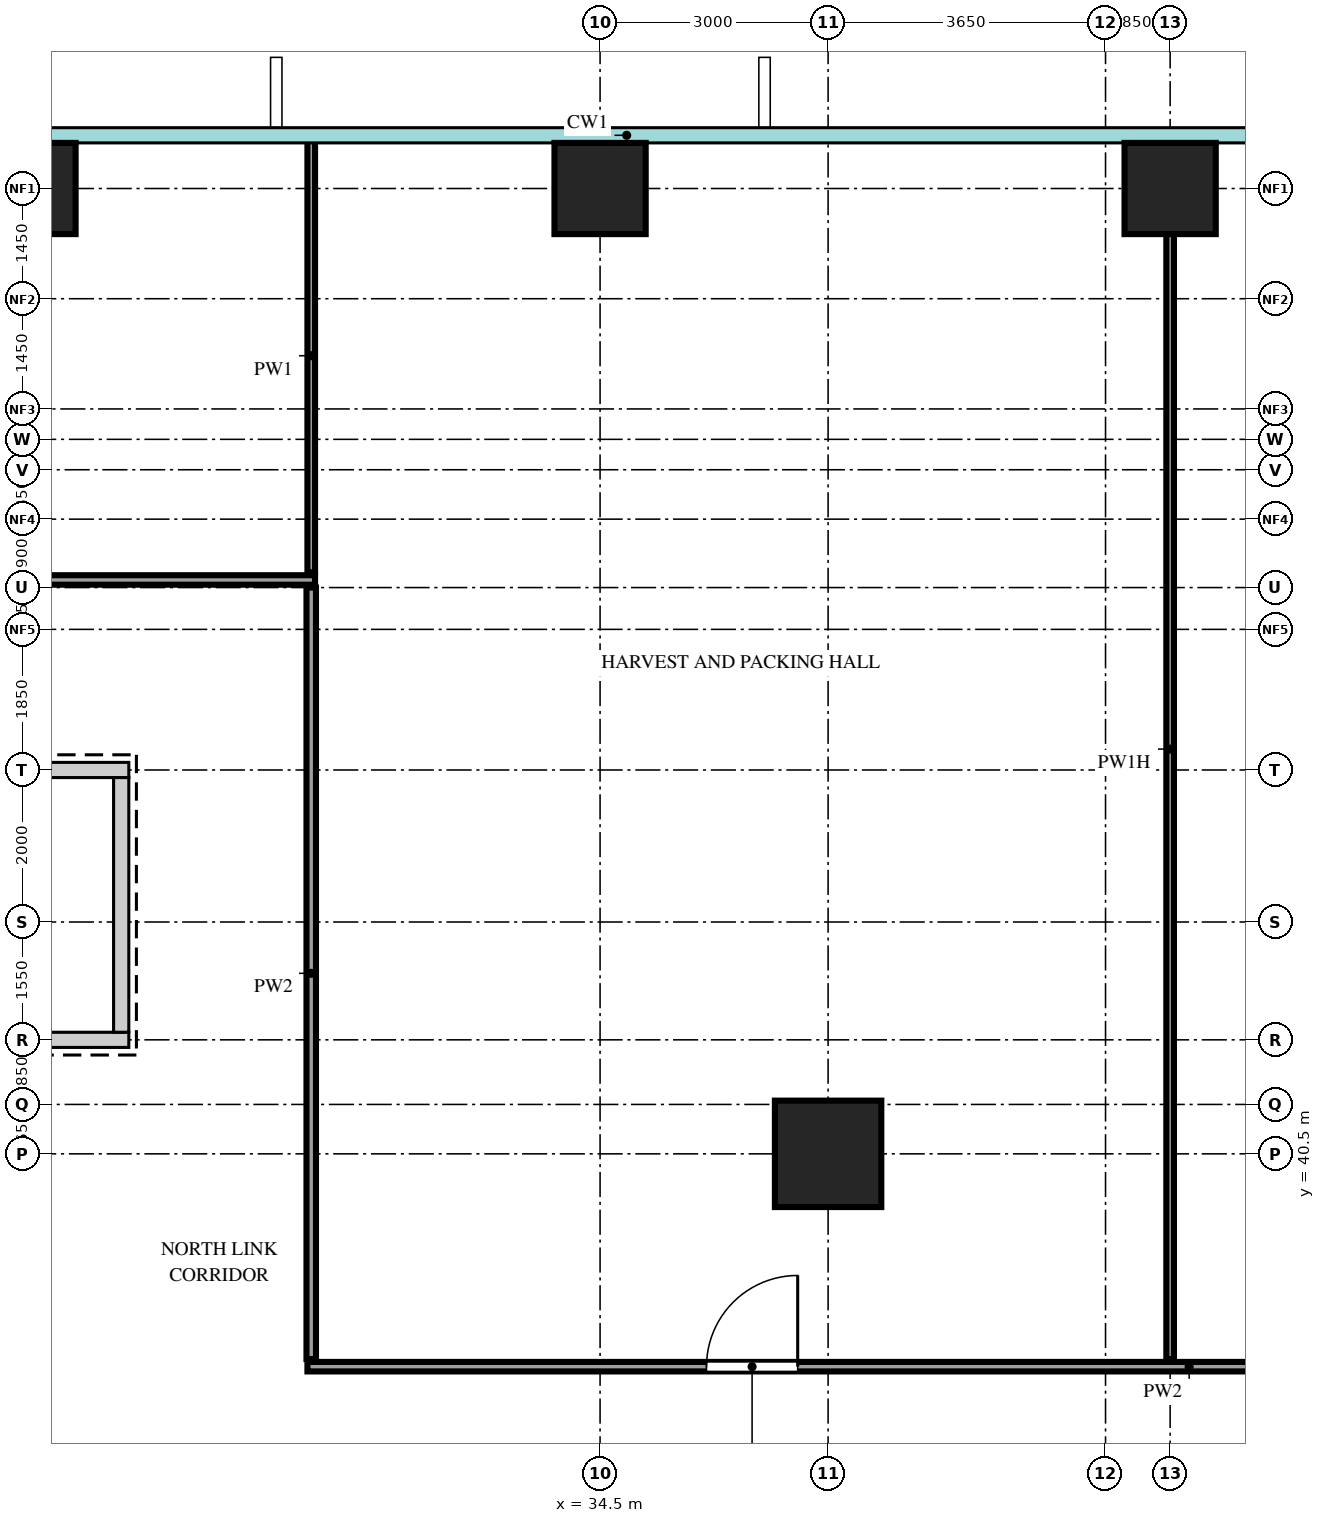
"""IFC4 building model, lengths in metres.
Left out: names, types, materials, properties, quantities, classifications, styles, units other than length and angle.
Written with IfcOpenShell. Run it as: python <this file> out.ifc"""

import sys

from ifc_helpers import new_model, si_unit, direction, frame, frame_2d, origin, origin_2d, place, context, subcontext, project, spatial, rectangle, extrude, source, transform, mapped, element, fill, save


model = new_model("IFC4")
c1 = context("Model", 3, precision=1e-05, world=origin(), true_north=direction((0.0, 1.0)))
c2 = subcontext(c1, "Body", "Model", "MODEL_VIEW")
j1 = project(units=[si_unit("LENGTHUNIT", "METRE"), si_unit("PLANEANGLEUNIT", "RADIAN")], contexts=[c1])
p1 = place(None, origin())
s1 = spatial("IfcSite", under=j1, at=p1, CompositionType="ELEMENT")
p2 = place(p1, origin())
s2 = spatial("IfcBuilding", under=s1, at=p2, CompositionType="ELEMENT")
p3 = place(p2, frame((0.0, 0.0, 33.0)))
s3 = spatial("IfcBuildingStorey", under=s2, at=p3, CompositionType="ELEMENT", Elevation=33.0)
m1 = source(origin(), c2, "Body", "SweptSolid", [
    extrude(rectangle(XDim=7.1, YDim=0.2, at=frame_2d((3.55, 0.0))), origin(), (0.0, 0.0, 1.0), 4.2),
])
p4 = place(p3, frame((21.2, 45.55, 0.0), z_axis=(0.0, 0.0, 1.0), x_axis=(1.0, 0.0, 0.0)))
e1 = element("IfcWall", 1, at=p4, inside=s3, PredefinedType="SHEAR", context=c2, shape_type="MappedRepresentation", body=[
    mapped(m1, transform((0.0, 0.0, 0.0))),
])
m2 = source(origin(), c2, "Body", "SweptSolid", [
    extrude(rectangle(XDim=1.2, YDim=2.1, at=frame_2d((0.6, 1.05))), frame((0.0, 0.11, 0.0), z_axis=(0.0, -1.0, 0.0), x_axis=(1.0, 0.0, 0.0)), (0.0, 0.0, 1.0), 0.22),
])
p5 = place(p4, frame((0.15, 0.0, 0.0)))
e2 = element("IfcOpeningElement", 2, at=p5, cuts=e1, PredefinedType="OPENING", context=c2, shape_type="MappedRepresentation", body=[
    mapped(m2, transform((0.0, 0.0, 0.0))),
])
p6 = place(p3, frame((21.2, 42.0, 0.0), z_axis=(0.0, 0.0, 1.0), x_axis=(1.0, 0.0, 0.0)))
e3 = element("IfcWall", 3, at=p6, inside=s3, PredefinedType="SHEAR", context=c2, shape_type="MappedRepresentation", body=[
    mapped(m1, transform((0.0, 0.0, 0.0))),
])
m3 = source(origin(), c2, "Body", "SweptSolid", [
    extrude(rectangle(XDim=3.35, YDim=0.2, at=frame_2d((1.675, 0.0))), origin(), (0.0, 0.0, 1.0), 4.2),
])
p7 = place(p3, frame((28.2, 42.1, 0.0), z_axis=(0.0, 0.0, 1.0), x_axis=(0.0, 1.0, 0.0)))
e4 = element("IfcWall", 4, at=p7, inside=s3, PredefinedType="SHEAR", context=c2, shape_type="MappedRepresentation", body=[
    mapped(m3, transform((0.0, 0.0, 0.0))),
])
m4 = source(origin(), c2, "Body", "SweptSolid", [
    extrude(rectangle(XDim=1.2, YDim=1.2, at=origin_2d()), origin(), (0.0, 0.0, 1.0), 4.2),
])
for number, where, z_axis, x_axis in (
    (5, (27.0, 53.2, 0.0), (0.0, 0.0, 1.0), (1.0, 0.0, 0.0)),
    (6, (34.5, 53.2, 0.0), (0.0, 0.0, 1.0), (1.0, 0.0, 0.0)),
    (7, (42.0, 53.2, 0.0), (0.0, 0.0, 1.0), (1.0, 0.0, 0.0)),
):
    element("IfcColumn", number, at=place(p3, frame(where, z_axis=z_axis, x_axis=x_axis)), inside=s3, PredefinedType="COLUMN", context=c2, shape_type="MappedRepresentation", body=[
        mapped(m4, transform((0.0, 0.0, 0.0))),
    ])
m5 = source(origin(), c2, "Body", "SweptSolid", [
    extrude(rectangle(XDim=1.4, YDim=1.4, at=origin_2d()), origin(), (0.0, 0.0, 1.0), 4.2),
])
p8 = place(p3, frame((37.5, 40.5, 0.0), z_axis=(0.0, 0.0, 1.0), x_axis=(1.0, 0.0, 0.0)))
e8 = element("IfcColumn", 8, at=p8, inside=s3, PredefinedType="COLUMN", context=c2, shape_type="MappedRepresentation", body=[
    mapped(m5, transform((0.0, 0.0, 0.0))),
])
m6 = source(origin(), c2, "Body", "SweptSolid", [
    extrude(rectangle(XDim=23.2, YDim=0.125, at=frame_2d((11.6, 0.0))), origin(), (0.0, 0.0, 1.0), 4.3),
])
p9 = place(p3, frame((30.65, 37.7, 0.0), z_axis=(0.0, 0.0, 1.0), x_axis=(1.0, 0.0, 0.0)))
e9 = element("IfcWall", 9, at=p9, inside=s3, PredefinedType="PARTITIONING", context=c2, shape_type="MappedRepresentation", body=[
    mapped(m6, transform((0.0, 0.0, 0.0))),
])
m7 = source(origin(), c2, "Body", "SweptSolid", [
    extrude(rectangle(XDim=1.2, YDim=2.1, at=frame_2d((0.6, 1.05))), frame((0.0, 0.073, 0.0), z_axis=(0.0, -1.0, 0.0), x_axis=(1.0, 0.0, 0.0)), (0.0, 0.0, 1.0), 0.145),
])
p10 = place(p9, frame((5.25, 0.0, 0.0)))
e10 = element("IfcOpeningElement", 10, at=p10, cuts=e9, PredefinedType="OPENING", context=c2, shape_type="MappedRepresentation", body=[
    mapped(m7, transform((0.0, 0.0, 0.0))),
])
p11 = place(p9, frame((16.75, 0.0, 0.0)))
e11 = element("IfcOpeningElement", 11, at=p11, cuts=e9, PredefinedType="OPENING", context=c2, shape_type="MappedRepresentation", body=[
    mapped(m7, transform((0.0, 0.0, 0.0))),
])
m8 = source(origin(), c2, "Body", "SweptSolid", [
    extrude(rectangle(XDim=10.15, YDim=0.125, at=frame_2d((5.075, 0.0))), origin(), (0.0, 0.0, 1.0), 4.3),
])
p12 = place(p3, frame((30.7, 37.8, 0.0), z_axis=(0.0, 0.0, 1.0), x_axis=(0.0, 1.0, 0.0)))
e12 = element("IfcWall", 12, at=p12, inside=s3, PredefinedType="PARTITIONING", context=c2, shape_type="MappedRepresentation", body=[
    mapped(m8, transform((0.0, 0.0, 0.0))),
])
m9 = source(origin(), c2, "Body", "SweptSolid", [
    extrude(rectangle(XDim=16.05, YDim=0.1, at=frame_2d((8.025, 0.0))), origin(), (0.0, 0.0, 1.0), 3.7),
])
p13 = place(p3, frame((42.0, 37.8, 0.0), z_axis=(0.0, 0.0, 1.0), x_axis=(0.0, 1.0, 0.0)))
e13 = element("IfcWall", 13, at=p13, inside=s3, PredefinedType="PARTITIONING", context=c2, shape_type="MappedRepresentation", body=[
    mapped(m9, transform((0.0, 0.0, 0.0))),
])
m10 = source(origin(), c2, "Body", "SweptSolid", [
    extrude(rectangle(XDim=26.45, YDim=0.125, at=frame_2d((13.225, 0.0))), origin(), (0.0, 0.0, 1.0), 4.3),
])
p14 = place(p3, frame((4.3, 48.05, 0.0), z_axis=(0.0, 0.0, 1.0), x_axis=(1.0, 0.0, 0.0)))
e14 = element("IfcWall", 14, at=p14, inside=s3, PredefinedType="PARTITIONING", context=c2, shape_type="MappedRepresentation", body=[
    mapped(m10, transform((0.0, 0.0, 0.0))),
])
m11 = source(origin(), c2, "Body", "SweptSolid", [
    extrude(rectangle(XDim=0.9, YDim=2.1, at=frame_2d((0.45, 1.05))), frame((0.0, 0.073, 0.0), z_axis=(0.0, -1.0, 0.0), x_axis=(1.0, 0.0, 0.0)), (0.0, 0.0, 1.0), 0.145),
])
p15 = place(p14, frame((3.35, 0.0, 0.0)))
e15 = element("IfcOpeningElement", 15, at=p15, cuts=e14, PredefinedType="OPENING", context=c2, shape_type="MappedRepresentation", body=[
    mapped(m11, transform((0.0, 0.0, 0.0))),
])
p16 = place(p14, frame((10.85, 0.0, 0.0)))
e16 = element("IfcOpeningElement", 16, at=p16, cuts=e14, PredefinedType="OPENING", context=c2, shape_type="MappedRepresentation", body=[
    mapped(m11, transform((0.0, 0.0, 0.0))),
])
p17 = place(p14, frame((20.35, 0.0, 0.0)))
e17 = element("IfcOpeningElement", 17, at=p17, cuts=e14, PredefinedType="OPENING", context=c2, shape_type="MappedRepresentation", body=[
    mapped(m11, transform((0.0, 0.0, 0.0))),
])
m12 = source(origin(), c2, "Body", "SweptSolid", [
    extrude(rectangle(XDim=5.7, YDim=0.1, at=frame_2d((2.85, 0.0))), origin(), (0.0, 0.0, 1.0), 4.3),
])
p18 = place(p3, frame((30.7, 48.15, 0.0), z_axis=(0.0, 0.0, 1.0), x_axis=(0.0, 1.0, 0.0)))
e18 = element("IfcWall", 18, at=p18, inside=s3, PredefinedType="PARTITIONING", context=c2, shape_type="MappedRepresentation", body=[
    mapped(m12, transform((0.0, 0.0, 0.0))),
])
m13 = source(origin(), c2, "Body", "SweptSolid", [
    extrude(rectangle(XDim=1.2, YDim=2.1, at=frame_2d((0.6, 1.05))), frame((0.0, 0.025, 0.0), z_axis=(0.0, -1.0, 0.0), x_axis=(1.0, 0.0, 0.0)), (0.0, 0.0, 1.0), 0.05),
])
p19 = place(p10, origin())
e19 = element("IfcDoor", 19, at=p19, inside=s3, OperationType="SINGLE_SWING_LEFT", PredefinedType="DOOR", context=c2, shape_type="MappedRepresentation", body=[
    mapped(m13, transform((0.0, 0.0, 0.0))),
])
fill(e10, e19)
save(model, sys.argv[1])
